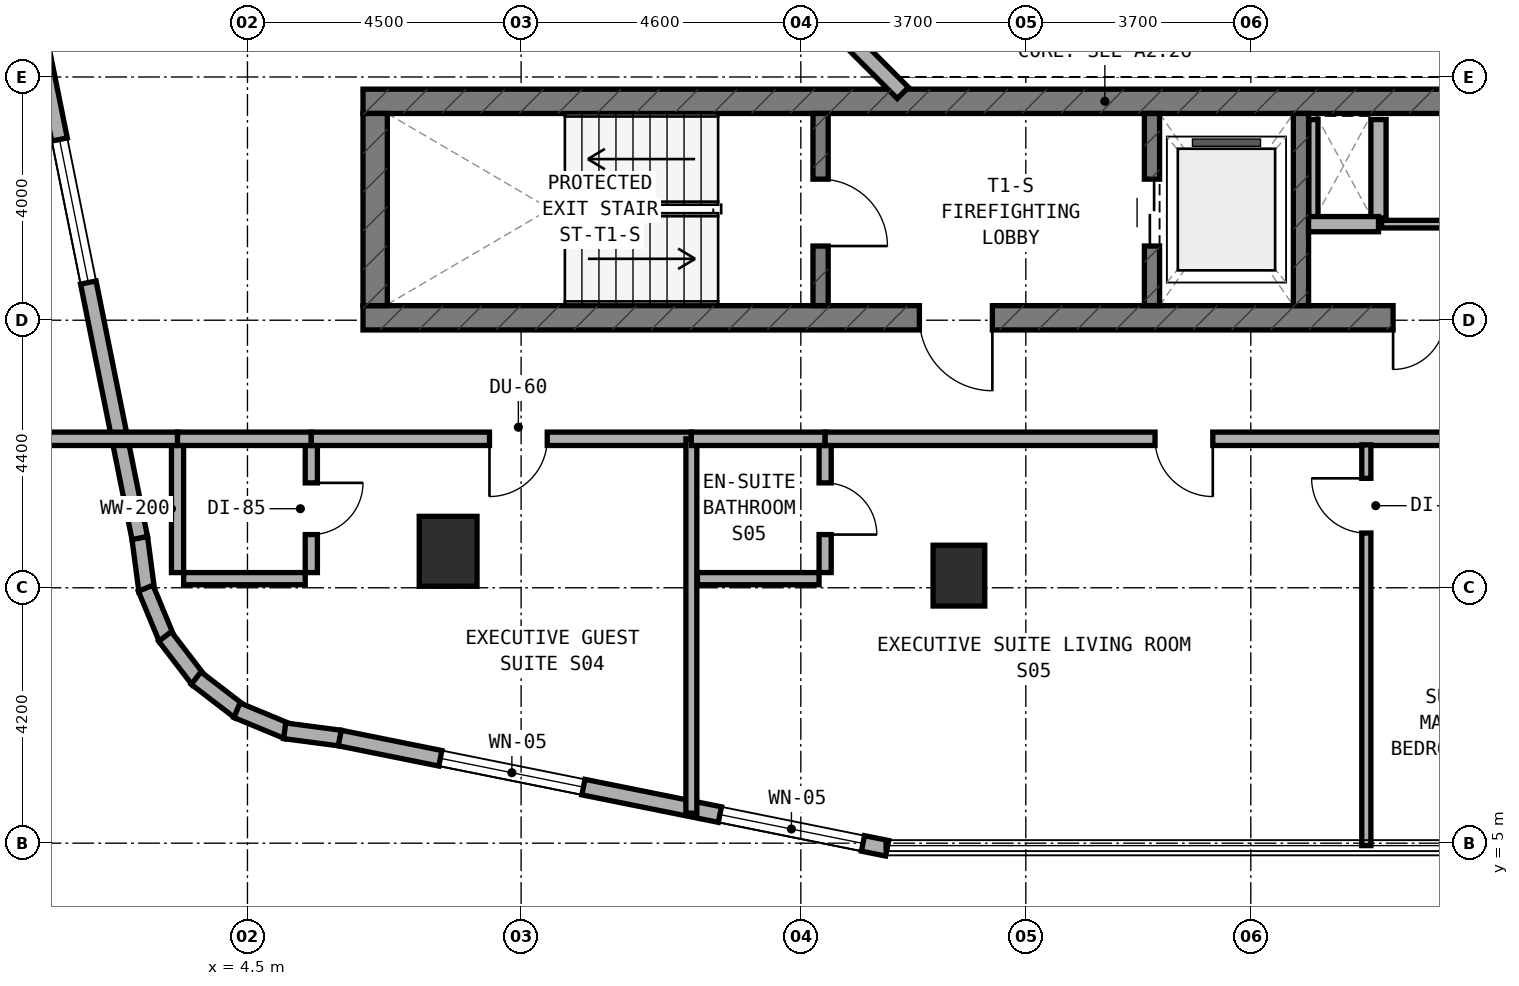
"""IFC4 building model, lengths in metres.
Left out: names, types, materials, properties, quantities, classifications, styles, units other than length and angle.
Written with IfcOpenShell. Run it as: python <this file> out.ifc"""

import sys

from ifc_helpers import new_model, si_unit, direction, frame, frame_2d, origin, origin_2d, place, context, subcontext, project, spatial, rectangle, extrude, element, fill, save


model = new_model("IFC4")
c1 = context("Model", 3, precision=1e-05, world=origin(), true_north=direction((0.0, 1.0)))
c2 = subcontext(c1, "Body", "Model", "MODEL_VIEW")
j1 = project(units=[si_unit("LENGTHUNIT", "METRE"), si_unit("PLANEANGLEUNIT", "RADIAN")], contexts=[c1])
p1 = place(None, origin())
s1 = spatial("IfcSite", under=j1, at=p1, CompositionType="ELEMENT")
p2 = place(p1, origin())
s2 = spatial("IfcBuilding", under=s1, at=p2, CompositionType="ELEMENT")
p3 = place(p2, frame((0.0, 0.0, 116.0)))
s3 = spatial("IfcBuildingStorey", under=s2, at=p3, CompositionType="ELEMENT", Elevation=116.0)
p4 = place(p3, frame((6.4, 13.64, 0.0), z_axis=(0.0, 0.0, 1.0), x_axis=(1.0, 0.0, 0.0)))
e1 = element("IfcWall", 1, at=p4, inside=s3, PredefinedType="SHEAR", context=c2, shape_type="SweptSolid", body=[
    extrude(rectangle(XDim=24.4, YDim=0.4, at=frame_2d((12.2, 0.0))), origin(), (0.0, 0.0, 1.0), 3.5),
])
p5 = place(p4, frame((9.15, 0.0, 0.0)))
e2 = element("IfcOpeningElement", 2, at=p5, cuts=e1, PredefinedType="OPENING", context=c2, shape_type="SweptSolid", body=[
    extrude(rectangle(XDim=1.2, YDim=2.15, at=frame_2d((0.6, 1.075))), frame((0.0, 0.21, 0.0), z_axis=(0.0, -1.0, 0.0), x_axis=(1.0, 0.0, 0.0)), (0.0, 0.0, 1.0), 0.42),
])
p6 = place(p4, frame((16.94, 0.0, 0.0)))
e3 = element("IfcOpeningElement", 3, at=p6, cuts=e1, PredefinedType="OPENING", context=c2, shape_type="SweptSolid", body=[
    extrude(rectangle(XDim=0.85, YDim=2.1, at=frame_2d((0.425, 1.05))), frame((0.0, 0.21, 0.0), z_axis=(0.0, -1.0, 0.0), x_axis=(1.0, 0.0, 0.0)), (0.0, 0.0, 1.0), 0.42),
])
p7 = place(p3, frame((6.4, 17.2, 0.0), z_axis=(0.0, 0.0, 1.0), x_axis=(1.0, 0.0, 0.0)))
e4 = element("IfcWall", 4, at=p7, inside=s3, PredefinedType="SHEAR", context=c2, shape_type="SweptSolid", body=[
    extrude(rectangle(XDim=24.4, YDim=0.4, at=frame_2d((12.2, 0.0))), origin(), (0.0, 0.0, 1.0), 3.5),
])
p8 = place(p3, frame((6.6, 13.84, 0.0), z_axis=(0.0, 0.0, 1.0), x_axis=(0.0, 1.0, 0.0)))
e5 = element("IfcWall", 5, at=p8, inside=s3, PredefinedType="SHEAR", context=c2, shape_type="SweptSolid", body=[
    extrude(rectangle(XDim=3.16, YDim=0.4, at=frame_2d((1.58, 0.0))), origin(), (0.0, 0.0, 1.0), 3.5),
])
p9 = place(p3, frame((13.925, 13.84, 0.0), z_axis=(0.0, 0.0, 1.0), x_axis=(0.0, 1.0, 0.0)))
e6 = element("IfcWall", 6, at=p9, inside=s3, PredefinedType="STANDARD", context=c2, shape_type="SweptSolid", body=[
    extrude(rectangle(XDim=3.16, YDim=0.25, at=frame_2d((1.58, 0.0))), origin(), (0.0, 0.0, 1.0), 3.18),
])
p10 = place(p9, frame((0.98, 0.0, 0.0)))
e7 = element("IfcOpeningElement", 7, at=p10, cuts=e6, PredefinedType="OPENING", context=c2, shape_type="SweptSolid", body=[
    extrude(rectangle(XDim=1.1, YDim=2.15, at=frame_2d((0.55, 1.075))), frame((0.0, 0.135, 0.0), z_axis=(0.0, -1.0, 0.0), x_axis=(1.0, 0.0, 0.0)), (0.0, 0.0, 1.0), 0.27),
])
p11 = place(p3, frame((19.375, 13.84, 0.0), z_axis=(0.0, 0.0, 1.0), x_axis=(0.0, 1.0, 0.0)))
e8 = element("IfcWall", 8, at=p11, inside=s3, PredefinedType="STANDARD", context=c2, shape_type="SweptSolid", body=[
    extrude(rectangle(XDim=3.16, YDim=0.25, at=frame_2d((1.58, 0.0))), origin(), (0.0, 0.0, 1.0), 3.18),
])
p12 = place(p11, frame((0.98, 0.0, 0.0)))
e9 = element("IfcOpeningElement", 9, at=p12, cuts=e8, PredefinedType="OPENING", context=c2, shape_type="SweptSolid", body=[
    extrude(rectangle(XDim=1.1, YDim=2.15, at=frame_2d((0.55, 1.075))), frame((0.0, 0.135, 0.0), z_axis=(0.0, -1.0, 0.0), x_axis=(1.0, 0.0, 0.0)), (0.0, 0.0, 1.0), 0.27),
])
p13 = place(p3, frame((21.825, 13.84, 0.0), z_axis=(0.0, 0.0, 1.0), x_axis=(0.0, 1.0, 0.0)))
e10 = element("IfcWall", 10, at=p13, inside=s3, PredefinedType="STANDARD", context=c2, shape_type="SweptSolid", body=[
    extrude(rectangle(XDim=3.16, YDim=0.25, at=frame_2d((1.58, 0.0))), origin(), (0.0, 0.0, 1.0), 3.18),
])
p14 = place(p3, frame((16.2, 9.4, 0.0), z_axis=(0.0, 0.0, 1.0), x_axis=(1.0, 0.0, 0.0)))
e11 = element("IfcColumn", 11, at=p14, inside=s3, PredefinedType="COLUMN", context=c2, shape_type="SweptSolid", body=[
    extrude(rectangle(XDim=0.85, YDim=1.0, at=origin_2d()), origin(), (0.0, 0.0, 1.0), 3.5),
])
p15 = place(p3, frame((7.8, 9.8, 0.0), z_axis=(0.0, 0.0, 1.0), x_axis=(1.0, 0.0, 0.0)))
e12 = element("IfcColumn", 12, at=p15, inside=s3, PredefinedType="COLUMN", context=c2, shape_type="SweptSolid", body=[
    extrude(rectangle(XDim=0.95, YDim=1.15, at=origin_2d()), origin(), (0.0, 0.0, 1.0), 3.5),
])
p16 = place(p3, frame((2.728, 10.025, 0.0), z_axis=(0.0, 0.0, 1.0), x_axis=(0.130953706898, -0.991388484223, 0.0)))
e13 = element("IfcWall", 13, at=p16, inside=s3, PredefinedType="STANDARD", context=c2, shape_type="SweptSolid", body=[
    extrude(rectangle(XDim=0.885, YDim=0.26, at=frame_2d((0.443, 0.0))), origin(), (0.0, 0.0, 1.0), 3.18),
])
p17 = place(p3, frame((2.826, 9.193, 0.0), z_axis=(0.0, 0.0, 1.0), x_axis=(0.383290660547, -0.923627776508, 0.0)))
e14 = element("IfcWall", 14, at=p17, inside=s3, PredefinedType="STANDARD", context=c2, shape_type="SweptSolid", body=[
    extrude(rectangle(XDim=0.903, YDim=0.26, at=frame_2d((0.452, 0.0))), origin(), (0.0, 0.0, 1.0), 3.18),
])
p18 = place(p3, frame((3.144, 8.399, 0.0), z_axis=(0.0, 0.0, 1.0), x_axis=(0.608624690463, -0.793458244748, 0.0)))
e15 = element("IfcWall", 15, at=p18, inside=s3, PredefinedType="STANDARD", context=c2, shape_type="SweptSolid", body=[
    extrude(rectangle(XDim=0.902, YDim=0.26, at=frame_2d((0.451, 0.0))), origin(), (0.0, 0.0, 1.0), 3.18),
])
p19 = place(p3, frame((3.655, 7.714, 0.0), z_axis=(0.0, 0.0, 1.0), x_axis=(0.793558456666, -0.608494022858, 0.0)))
e16 = element("IfcWall", 16, at=p19, inside=s3, PredefinedType="STANDARD", context=c2, shape_type="SweptSolid", body=[
    extrude(rectangle(XDim=0.902, YDim=0.26, at=frame_2d((0.451, 0.0))), origin(), (0.0, 0.0, 1.0), 3.18),
])
p20 = place(p3, frame((4.327, 7.186, 0.0), z_axis=(0.0, 0.0, 1.0), x_axis=(0.923683767999, -0.383155708213, 0.0)))
e17 = element("IfcWall", 17, at=p20, inside=s3, PredefinedType="STANDARD", context=c2, shape_type="SweptSolid", body=[
    extrude(rectangle(XDim=0.903, YDim=0.26, at=frame_2d((0.451, 0.0))), origin(), (0.0, 0.0, 1.0), 3.18),
])
p21 = place(p3, frame((5.112, 6.848, 0.0), z_axis=(0.0, 0.0, 1.0), x_axis=(0.991487658083, -0.130200706103, 0.0)))
e18 = element("IfcWall", 18, at=p21, inside=s3, PredefinedType="STANDARD", context=c2, shape_type="SweptSolid", body=[
    extrude(rectangle(XDim=0.921, YDim=0.26, at=frame_2d((0.46, 0.0))), origin(), (0.0, 0.0, 1.0), 3.18),
])
p22 = place(p3, frame((6.018, 6.729, 0.0), z_axis=(0.0, 0.0, 1.0), x_axis=(0.980315963543, -0.197435082048, 0.0)))
e19 = element("IfcWall", 19, at=p22, inside=s3, PredefinedType="STANDARD", context=c2, shape_type="SweptSolid", body=[
    extrude(rectangle(XDim=9.183, YDim=0.26, at=frame_2d((4.591, 0.0))), origin(), (0.0, 0.0, 1.0), 3.18),
])
p23 = place(p22, frame((1.687, 0.0, 0.8)))
e20 = element("IfcOpeningElement", 20, at=p23, cuts=e19, PredefinedType="OPENING", context=c2, shape_type="SweptSolid", body=[
    extrude(rectangle(XDim=2.4, YDim=1.6, at=frame_2d((1.2, 0.8))), frame((0.0, 0.14, 0.0), z_axis=(0.0, -1.0, 0.0), x_axis=(1.0, 0.0, 0.0)), (0.0, 0.0, 1.0), 0.28),
])
p24 = place(p22, frame((6.377, 0.0, 0.8)))
e21 = element("IfcOpeningElement", 21, at=p24, cuts=e19, PredefinedType="OPENING", context=c2, shape_type="SweptSolid", body=[
    extrude(rectangle(XDim=2.4, YDim=1.6, at=frame_2d((1.2, 0.8))), frame((0.0, 0.14, 0.0), z_axis=(0.0, -1.0, 0.0), x_axis=(1.0, 0.0, 0.0)), (0.0, 0.0, 1.0), 0.28),
])
p25 = place(p3, frame((0.916, 19.02, 0.0), z_axis=(0.0, 0.0, 1.0), x_axis=(0.197435082048, -0.980315963543, 0.0)))
e22 = element("IfcWall", 22, at=p25, inside=s3, PredefinedType="STANDARD", context=c2, shape_type="SweptSolid", body=[
    extrude(rectangle(XDim=9.183, YDim=0.26, at=frame_2d((4.591, 0.0))), origin(), (0.0, 0.0, 1.0), 3.18),
])
p26 = place(p25, frame((2.497, 0.0, 0.8)))
e23 = element("IfcOpeningElement", 23, at=p26, cuts=e22, PredefinedType="OPENING", context=c2, shape_type="SweptSolid", body=[
    extrude(rectangle(XDim=2.4, YDim=1.6, at=frame_2d((1.2, 0.8))), frame((0.0, 0.14, 0.0), z_axis=(0.0, -1.0, 0.0), x_axis=(1.0, 0.0, 0.0)), (0.0, 0.0, 1.0), 0.28),
])
p27 = place(p3, frame((13.444, 19.172, 0.0), z_axis=(0.0, 0.0, 1.0), x_axis=(0.707059717605, -0.707153841636, 0.0)))
e24 = element("IfcWall", 24, at=p27, inside=s3, PredefinedType="STANDARD", context=c2, shape_type="SweptSolid", body=[
    extrude(rectangle(XDim=2.594, YDim=0.26, at=frame_2d((1.297, 0.0))), origin(), (0.0, 0.0, 1.0), 3.18),
])
p28 = place(p3, frame((22.03, 15.28, 0.0), z_axis=(0.0, 0.0, 1.0), x_axis=(0.0, 1.0, 0.0)))
e25 = element("IfcWall", 25, at=p28, inside=s3, PredefinedType="PARTITIONING", context=c2, shape_type="SweptSolid", body=[
    extrude(rectangle(XDim=1.62, YDim=0.15, at=frame_2d((0.81, 0.0))), origin(), (0.0, 0.0, 1.0), 3.18),
])
p29 = place(p3, frame((23.1, 15.28, 0.0), z_axis=(0.0, 0.0, 1.0), x_axis=(0.0, 1.0, 0.0)))
e26 = element("IfcWall", 26, at=p29, inside=s3, PredefinedType="SOLIDWALL", context=c2, shape_type="SweptSolid", body=[
    extrude(rectangle(XDim=1.62, YDim=0.25, at=frame_2d((0.81, 0.0))), origin(), (0.0, 0.0, 1.0), 3.18),
])
p30 = place(p3, frame((21.95, 15.18, 0.0), z_axis=(0.0, 0.0, 1.0), x_axis=(1.0, 0.0, 0.0)))
e27 = element("IfcWall", 27, at=p30, inside=s3, PredefinedType="SOLIDWALL", context=c2, shape_type="SweptSolid", body=[
    extrude(rectangle(XDim=1.15, YDim=0.25, at=frame_2d((0.575, 0.0))), origin(), (0.0, 0.0, 1.0), 3.18),
])
p31 = place(p3, frame((23.15, 15.18, 0.0), z_axis=(0.0, 0.0, 1.0), x_axis=(1.0, 0.0, 0.0)))
e28 = element("IfcWall", 28, at=p31, inside=s3, PredefinedType="PARTITIONING", context=c2, shape_type="SweptSolid", body=[
    extrude(rectangle(XDim=1.35, YDim=0.125, at=frame_2d((0.675, 0.0))), origin(), (0.0, 0.0, 1.0), 3.18),
])
p32 = place(p3, frame((5.55, 9.45, 0.0), z_axis=(0.0, 0.0, 1.0), x_axis=(0.0, 1.0, 0.0)))
e29 = element("IfcWall", 29, at=p32, inside=s3, PredefinedType="PLUMBINGWALL", context=c2, shape_type="SweptSolid", body=[
    extrude(rectangle(XDim=2.1, YDim=0.2, at=frame_2d((1.05, 0.0))), origin(), (0.0, 0.0, 1.0), 3.18),
])
p33 = place(p32, frame((0.625, 0.0, 0.0)))
e30 = element("IfcOpeningElement", 30, at=p33, cuts=e29, PredefinedType="OPENING", context=c2, shape_type="SweptSolid", body=[
    extrude(rectangle(XDim=0.85, YDim=2.1, at=frame_2d((0.425, 1.05))), frame((0.0, 0.11, 0.0), z_axis=(0.0, -1.0, 0.0), x_axis=(1.0, 0.0, 0.0)), (0.0, 0.0, 1.0), 0.22),
])
p34 = place(p3, frame((3.45, 9.35, 0.0), z_axis=(0.0, 0.0, 1.0), x_axis=(1.0, 0.0, 0.0)))
e31 = element("IfcWall", 31, at=p34, inside=s3, PredefinedType="PLUMBINGWALL", context=c2, shape_type="SweptSolid", body=[
    extrude(rectangle(XDim=2.0, YDim=0.2, at=frame_2d((1.0, 0.0))), origin(), (0.0, 0.0, 1.0), 3.18),
])
p35 = place(p3, frame((3.35, 9.45, 0.0), z_axis=(0.0, 0.0, 1.0), x_axis=(0.0, 1.0, 0.0)))
e32 = element("IfcWall", 32, at=p35, inside=s3, PredefinedType="PLUMBINGWALL", context=c2, shape_type="SweptSolid", body=[
    extrude(rectangle(XDim=2.1, YDim=0.2, at=frame_2d((1.05, 0.0))), origin(), (0.0, 0.0, 1.0), 3.18),
])
p36 = place(p3, frame((0.96, 11.65, 0.0), z_axis=(0.0, 0.0, 1.0), x_axis=(1.0, 0.0, 0.0)))
e33 = element("IfcWall", 33, at=p36, inside=s3, PredefinedType="SOLIDWALL", context=c2, shape_type="SweptSolid", body=[
    extrude(rectangle(XDim=2.39, YDim=0.22, at=frame_2d((1.195, 0.0))), origin(), (0.0, 0.0, 1.0), 3.18),
])
p37 = place(p3, frame((3.35, 11.65, 0.0), z_axis=(0.0, 0.0, 1.0), x_axis=(1.0, 0.0, 0.0)))
e34 = element("IfcWall", 34, at=p37, inside=s3, PredefinedType="SOLIDWALL", context=c2, shape_type="SweptSolid", body=[
    extrude(rectangle(XDim=2.2, YDim=0.22, at=frame_2d((1.1, 0.0))), origin(), (0.0, 0.0, 1.0), 3.18),
])
p38 = place(p3, frame((5.55, 11.65, 0.0), z_axis=(0.0, 0.0, 1.0), x_axis=(1.0, 0.0, 0.0)))
e35 = element("IfcWall", 35, at=p38, inside=s3, PredefinedType="SOLIDWALL", context=c2, shape_type="SweptSolid", body=[
    extrude(rectangle(XDim=6.25, YDim=0.22, at=frame_2d((3.125, 0.0))), origin(), (0.0, 0.0, 1.0), 2.655),
])
p39 = place(p38, frame((2.93, 0.0, 0.0)))
e36 = element("IfcOpeningElement", 36, at=p39, cuts=e35, PredefinedType="OPENING", context=c2, shape_type="SweptSolid", body=[
    extrude(rectangle(XDim=0.95, YDim=2.1, at=frame_2d((0.475, 1.05))), frame((0.0, 0.12, 0.0), z_axis=(0.0, -1.0, 0.0), x_axis=(1.0, 0.0, 0.0)), (0.0, 0.0, 1.0), 0.24),
])
p40 = place(p3, frame((11.8, 5.493, 0.0), z_axis=(0.0, 0.0, 1.0), x_axis=(0.0, 1.0, 0.0)))
e37 = element("IfcWall", 37, at=p40, inside=s3, PredefinedType="SOLIDWALL", context=c2, shape_type="SweptSolid", body=[
    extrude(rectangle(XDim=6.157, YDim=0.18, at=frame_2d((3.079, 0.0))), origin(), (0.0, 0.0, 1.0), 2.795),
])
p41 = place(p3, frame((14.0, 9.45, 0.0), z_axis=(0.0, 0.0, 1.0), x_axis=(0.0, 1.0, 0.0)))
e38 = element("IfcWall", 38, at=p41, inside=s3, PredefinedType="PLUMBINGWALL", context=c2, shape_type="SweptSolid", body=[
    extrude(rectangle(XDim=2.1, YDim=0.2, at=frame_2d((1.05, 0.0))), origin(), (0.0, 0.0, 1.0), 2.795),
])
p42 = place(p41, frame((0.625, 0.0, 0.0)))
e39 = element("IfcOpeningElement", 39, at=p42, cuts=e38, PredefinedType="OPENING", context=c2, shape_type="SweptSolid", body=[
    extrude(rectangle(XDim=0.85, YDim=2.1, at=frame_2d((0.425, 1.05))), frame((0.0, 0.11, 0.0), z_axis=(0.0, -1.0, 0.0), x_axis=(1.0, 0.0, 0.0)), (0.0, 0.0, 1.0), 0.22),
])
p43 = place(p3, frame((11.9, 9.35, 0.0), z_axis=(0.0, 0.0, 1.0), x_axis=(1.0, 0.0, 0.0)))
e40 = element("IfcWall", 40, at=p43, inside=s3, PredefinedType="PLUMBINGWALL", context=c2, shape_type="SweptSolid", body=[
    extrude(rectangle(XDim=2.0, YDim=0.2, at=frame_2d((1.0, 0.0))), origin(), (0.0, 0.0, 1.0), 2.795),
])
p44 = place(p3, frame((11.8, 11.65, 0.0), z_axis=(0.0, 0.0, 1.0), x_axis=(1.0, 0.0, 0.0)))
e41 = element("IfcWall", 41, at=p44, inside=s3, PredefinedType="SOLIDWALL", context=c2, shape_type="SweptSolid", body=[
    extrude(rectangle(XDim=2.2, YDim=0.22, at=frame_2d((1.1, 0.0))), origin(), (0.0, 0.0, 1.0), 3.18),
])
p45 = place(p3, frame((14.0, 11.65, 0.0), z_axis=(0.0, 0.0, 1.0), x_axis=(1.0, 0.0, 0.0)))
e42 = element("IfcWall", 42, at=p45, inside=s3, PredefinedType="SOLIDWALL", context=c2, shape_type="SweptSolid", body=[
    extrude(rectangle(XDim=11.8, YDim=0.22, at=frame_2d((5.9, 0.0))), origin(), (0.0, 0.0, 1.0), 2.655),
])
p46 = place(p45, frame((5.425, 0.0, 0.0)))
e43 = element("IfcOpeningElement", 43, at=p46, cuts=e42, PredefinedType="OPENING", context=c2, shape_type="SweptSolid", body=[
    extrude(rectangle(XDim=0.95, YDim=2.1, at=frame_2d((0.475, 1.05))), frame((0.0, 0.12, 0.0), z_axis=(0.0, -1.0, 0.0), x_axis=(1.0, 0.0, 0.0)), (0.0, 0.0, 1.0), 0.24),
])
p47 = place(p3, frame((22.9, 4.96, 0.0), z_axis=(0.0, 0.0, 1.0), x_axis=(0.0, 1.0, 0.0)))
e44 = element("IfcWall", 44, at=p47, inside=s3, PredefinedType="PARTITIONING", context=c2, shape_type="SweptSolid", body=[
    extrude(rectangle(XDim=6.59, YDim=0.15, at=frame_2d((3.295, 0.0))), origin(), (0.0, 0.0, 1.0), 2.795),
])
p48 = place(p47, frame((5.14, 0.0, 0.0)))
e45 = element("IfcOpeningElement", 45, at=p48, cuts=e44, PredefinedType="OPENING", context=c2, shape_type="SweptSolid", body=[
    extrude(rectangle(XDim=0.9, YDim=2.1, at=frame_2d((0.45, 1.05))), frame((0.0, 0.085, 0.0), z_axis=(0.0, -1.0, 0.0), x_axis=(1.0, 0.0, 0.0)), (0.0, 0.0, 1.0), 0.17),
])
p49 = place(p23, origin())
e46 = element("IfcWindow", 46, at=p49, inside=s3, PartitioningType="SINGLE_PANEL", PredefinedType="WINDOW", context=c2, shape_type="SweptSolid", body=[
    extrude(rectangle(XDim=2.4, YDim=1.6, at=frame_2d((1.2, 0.8))), frame((0.0, 0.03, 0.0), z_axis=(0.0, -1.0, 0.0), x_axis=(1.0, 0.0, 0.0)), (0.0, 0.0, 1.0), 0.06),
])
fill(e20, e46)
p50 = place(p24, origin())
e47 = element("IfcWindow", 47, at=p50, inside=s3, PartitioningType="SINGLE_PANEL", PredefinedType="WINDOW", context=c2, shape_type="SweptSolid", body=[
    extrude(rectangle(XDim=2.4, YDim=1.6, at=frame_2d((1.2, 0.8))), frame((0.0, 0.03, 0.0), z_axis=(0.0, -1.0, 0.0), x_axis=(1.0, 0.0, 0.0)), (0.0, 0.0, 1.0), 0.06),
])
fill(e21, e47)
p51 = place(p26, origin())
e48 = element("IfcWindow", 48, at=p51, inside=s3, PartitioningType="SINGLE_PANEL", PredefinedType="WINDOW", context=c2, shape_type="SweptSolid", body=[
    extrude(rectangle(XDim=2.4, YDim=1.6, at=frame_2d((1.2, 0.8))), frame((0.0, 0.03, 0.0), z_axis=(0.0, -1.0, 0.0), x_axis=(1.0, 0.0, 0.0)), (0.0, 0.0, 1.0), 0.06),
])
fill(e23, e48)
p52 = place(p10, frame((1.1, 0.0, 0.0), z_axis=(0.0, 0.0, 1.0), x_axis=(-1.0, 0.0, 0.0)))
e49 = element("IfcDoor", 49, at=p52, inside=s3, OperationType="SINGLE_SWING_RIGHT", PredefinedType="DOOR", context=c2, shape_type="SweptSolid", body=[
    extrude(rectangle(XDim=1.1, YDim=2.15, at=frame_2d((0.55, 1.075))), frame((0.0, 0.025, 0.0), z_axis=(0.0, -1.0, 0.0), x_axis=(1.0, 0.0, 0.0)), (0.0, 0.0, 1.0), 0.05),
])
fill(e7, e49)
p53 = place(p5, frame((1.2, 0.0, 0.0), z_axis=(0.0, 0.0, 1.0), x_axis=(-1.0, 0.0, 0.0)))
e50 = element("IfcDoor", 50, at=p53, inside=s3, OperationType="SINGLE_SWING_LEFT", PredefinedType="DOOR", context=c2, shape_type="SweptSolid", body=[
    extrude(rectangle(XDim=1.2, YDim=2.15, at=frame_2d((0.6, 1.075))), frame((0.0, 0.025, 0.0), z_axis=(0.0, -1.0, 0.0), x_axis=(1.0, 0.0, 0.0)), (0.0, 0.0, 1.0), 0.05),
])
fill(e2, e50)
p54 = place(p12, origin())
e51 = element("IfcDoor", 51, at=p54, inside=s3, OperationType="DOUBLE_DOOR_SLIDING", PredefinedType="DOOR", context=c2, shape_type="SweptSolid", body=[
    extrude(rectangle(XDim=1.1, YDim=2.15, at=frame_2d((0.55, 1.075))), frame((0.0, 0.025, 0.0), z_axis=(0.0, -1.0, 0.0), x_axis=(1.0, 0.0, 0.0)), (0.0, 0.0, 1.0), 0.05),
])
fill(e9, e51)
p55 = place(p6, frame((0.85, 0.0, 0.0), z_axis=(0.0, 0.0, 1.0), x_axis=(-1.0, 0.0, 0.0)))
e52 = element("IfcDoor", 52, at=p55, inside=s3, OperationType="SINGLE_SWING_RIGHT", PredefinedType="DOOR", context=c2, shape_type="SweptSolid", body=[
    extrude(rectangle(XDim=0.85, YDim=2.1, at=frame_2d((0.425, 1.05))), frame((0.0, 0.025, 0.0), z_axis=(0.0, -1.0, 0.0), x_axis=(1.0, 0.0, 0.0)), (0.0, 0.0, 1.0), 0.05),
])
fill(e3, e52)
p56 = place(p33, frame((0.85, 0.0, 0.0), z_axis=(0.0, 0.0, 1.0), x_axis=(-1.0, 0.0, 0.0)))
e53 = element("IfcDoor", 53, at=p56, inside=s3, OperationType="SINGLE_SWING_LEFT", PredefinedType="DOOR", context=c2, shape_type="SweptSolid", body=[
    extrude(rectangle(XDim=0.85, YDim=2.1, at=frame_2d((0.425, 1.05))), frame((0.0, 0.025, 0.0), z_axis=(0.0, -1.0, 0.0), x_axis=(1.0, 0.0, 0.0)), (0.0, 0.0, 1.0), 0.05),
])
fill(e30, e53)
p57 = place(p39, frame((0.95, 0.0, 0.0), z_axis=(0.0, 0.0, 1.0), x_axis=(-1.0, 0.0, 0.0)))
e54 = element("IfcDoor", 54, at=p57, inside=s3, OperationType="SINGLE_SWING_RIGHT", PredefinedType="DOOR", context=c2, shape_type="SweptSolid", body=[
    extrude(rectangle(XDim=0.95, YDim=2.1, at=frame_2d((0.475, 1.05))), frame((0.0, 0.025, 0.0), z_axis=(0.0, -1.0, 0.0), x_axis=(1.0, 0.0, 0.0)), (0.0, 0.0, 1.0), 0.05),
])
fill(e36, e54)
p58 = place(p42, frame((0.85, 0.0, 0.0), z_axis=(0.0, 0.0, 1.0), x_axis=(-1.0, 0.0, 0.0)))
e55 = element("IfcDoor", 55, at=p58, inside=s3, OperationType="SINGLE_SWING_RIGHT", PredefinedType="DOOR", context=c2, shape_type="SweptSolid", body=[
    extrude(rectangle(XDim=0.85, YDim=2.1, at=frame_2d((0.425, 1.05))), frame((0.0, 0.025, 0.0), z_axis=(0.0, -1.0, 0.0), x_axis=(1.0, 0.0, 0.0)), (0.0, 0.0, 1.0), 0.05),
])
fill(e39, e55)
p59 = place(p46, frame((0.95, 0.0, 0.0), z_axis=(0.0, 0.0, 1.0), x_axis=(-1.0, 0.0, 0.0)))
e56 = element("IfcDoor", 56, at=p59, inside=s3, OperationType="SINGLE_SWING_LEFT", PredefinedType="DOOR", context=c2, shape_type="SweptSolid", body=[
    extrude(rectangle(XDim=0.95, YDim=2.1, at=frame_2d((0.475, 1.05))), frame((0.0, 0.025, 0.0), z_axis=(0.0, -1.0, 0.0), x_axis=(1.0, 0.0, 0.0)), (0.0, 0.0, 1.0), 0.05),
])
fill(e43, e56)
p60 = place(p48, origin())
e57 = element("IfcDoor", 57, at=p60, inside=s3, OperationType="SINGLE_SWING_RIGHT", PredefinedType="DOOR", context=c2, shape_type="SweptSolid", body=[
    extrude(rectangle(XDim=0.9, YDim=2.1, at=frame_2d((0.45, 1.05))), frame((0.0, 0.025, 0.0), z_axis=(0.0, -1.0, 0.0), x_axis=(1.0, 0.0, 0.0)), (0.0, 0.0, 1.0), 0.05),
])
fill(e45, e57)
save(model, sys.argv[1])
